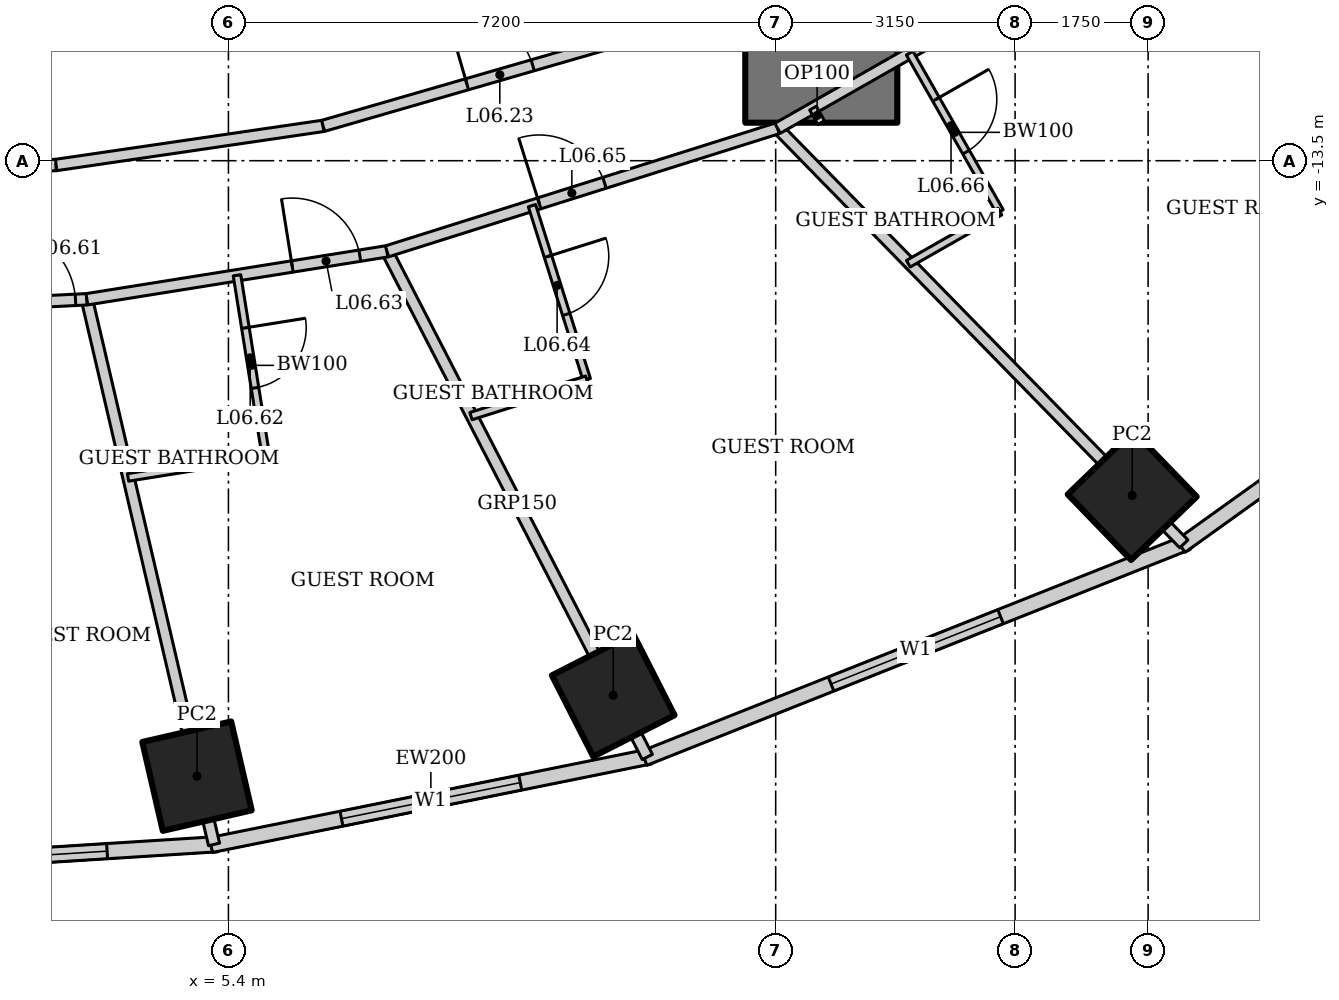
"""IFC4 building model, lengths in metres.
Left out: names, types, materials, properties, quantities, classifications, styles, units other than length and angle.
Written with IfcOpenShell. Run it as: python <this file> out.ifc"""

import sys

from ifc_helpers import new_model, si_unit, direction, frame, frame_2d, origin, origin_2d, place, context, subcontext, project, spatial, rectangle, hollow_rectangle, extrude, element, fill, save


model = new_model("IFC4")
c1 = context("Model", 3, precision=1e-05, world=origin(), true_north=direction((0.0, 1.0)))
c2 = subcontext(c1, "Body", "Model", "MODEL_VIEW")
j1 = project(units=[si_unit("LENGTHUNIT", "METRE"), si_unit("PLANEANGLEUNIT", "RADIAN")], contexts=[c1])
p1 = place(None, origin())
s1 = spatial("IfcSite", under=j1, at=p1, CompositionType="ELEMENT")
p2 = place(p1, origin())
s2 = spatial("IfcBuilding", under=s1, at=p2, CompositionType="ELEMENT")
p3 = place(p2, frame((0.0, 0.0, 37.0)))
s3 = spatial("IfcBuildingStorey", under=s2, at=p3, CompositionType="ELEMENT", Elevation=37.0)
for number, where, z_axis, x_axis in (
    (1, (4.986, -21.598, 0.0), (0.0, 0.0, 1.0), (0.974, 0.225, 0.0)),
    (2, (10.463, -20.534, 0.0), (0.0, 0.0, 1.0), (0.891, 0.454, 0.0)),
    (3, (17.291, -17.905, 0.0), (0.0, 0.0, 1.0), (0.719, 0.695, 0.0)),
):
    element("IfcColumn", number, at=place(p3, frame(where, z_axis=z_axis, x_axis=x_axis)), inside=s3, PredefinedType="COLUMN", context=c2, shape_type="SweptSolid", body=[
        extrude(hollow_rectangle(XDim=1.2, YDim=1.2, WallThickness=0.1, at=origin_2d()), origin(), (0.0, 0.0, 1.0), 3.6),
    ])
p4 = place(p3, frame((13.2, -13.0, 0.0), z_axis=(0.0, 0.0, 1.0), x_axis=(0.0, 1.0, 0.0)))
e4 = element("IfcWall", 4, at=p4, inside=s3, PredefinedType="SHEAR", context=c2, shape_type="SweptSolid", body=[
    extrude(rectangle(XDim=26.0, YDim=2.0, at=frame_2d((13.0, 0.0))), origin(), (0.0, 0.0, 1.0), 3.6),
])
p5 = place(p4, frame((12.1, 0.0, 0.0)))
e5 = element("IfcOpeningElement", 5, at=p5, cuts=e4, PredefinedType="OPENING", context=c2, shape_type="SweptSolid", body=[
    extrude(rectangle(XDim=1.8, YDim=2.1, at=frame_2d((0.9, 1.05))), frame((0.0, 1.01, 0.0), z_axis=(0.0, -1.0, 0.0), x_axis=(1.0, 0.0, 0.0)), (0.0, 0.0, 1.0), 2.02),
])
p6 = place(p3, frame((-0.041, -22.827, 0.0), z_axis=(0.0, 0.0, 1.0), x_axis=(0.998018582375, 0.062919863585, 0.0)))
e6 = element("IfcWall", 6, at=p6, inside=s3, PredefinedType="SOLIDWALL", context=c2, shape_type="SweptSolid", body=[
    extrude(rectangle(XDim=5.304, YDim=0.2, at=frame_2d((2.652, 0.0))), origin(), (0.0, 0.0, 1.0), 3.45),
])
p7 = place(p6, frame((1.452, 0.0, 0.5)))
e7 = element("IfcOpeningElement", 7, at=p7, cuts=e6, PredefinedType="OPENING", context=c2, shape_type="SweptSolid", body=[
    extrude(rectangle(XDim=2.4, YDim=2.2, at=frame_2d((1.2, 1.1))), frame((0.0, 0.11, 0.0), z_axis=(0.0, -1.0, 0.0), x_axis=(1.0, 0.0, 0.0)), (0.0, 0.0, 1.0), 0.22),
])
p8 = place(p3, frame((5.17, -22.504, 0.0), z_axis=(0.0, 0.0, 1.0), x_axis=(0.980251657452, 0.197754110105, 0.0)))
e8 = element("IfcWall", 8, at=p8, inside=s3, PredefinedType="SOLIDWALL", context=c2, shape_type="SweptSolid", body=[
    extrude(rectangle(XDim=5.904, YDim=0.2, at=frame_2d((2.952, 0.0))), origin(), (0.0, 0.0, 1.0), 3.45),
])
p9 = place(p8, frame((1.752, 0.0, 0.5)))
e9 = element("IfcOpeningElement", 9, at=p9, cuts=e8, PredefinedType="OPENING", context=c2, shape_type="SweptSolid", body=[
    extrude(rectangle(XDim=2.4, YDim=2.2, at=frame_2d((1.2, 1.1))), frame((0.0, 0.11, 0.0), z_axis=(0.0, -1.0, 0.0), x_axis=(1.0, 0.0, 0.0)), (0.0, 0.0, 1.0), 0.22),
])
p10 = place(p3, frame((10.869, -21.363, 0.0), z_axis=(0.0, 0.0, 1.0), x_axis=(0.929358351251, 0.369178892895, 0.0)))
e10 = element("IfcWall", 10, at=p10, inside=s3, PredefinedType="SOLIDWALL", context=c2, shape_type="SweptSolid", body=[
    extrude(rectangle(XDim=7.692, YDim=0.2, at=frame_2d((3.846, 0.0))), origin(), (0.0, 0.0, 1.0), 3.45),
])
p11 = place(p10, frame((2.646, 0.0, 0.5)))
e11 = element("IfcOpeningElement", 11, at=p11, cuts=e10, PredefinedType="OPENING", context=c2, shape_type="SweptSolid", body=[
    extrude(rectangle(XDim=2.4, YDim=2.2, at=frame_2d((1.2, 1.1))), frame((0.0, 0.11, 0.0), z_axis=(0.0, -1.0, 0.0), x_axis=(1.0, 0.0, 0.0)), (0.0, 0.0, 1.0), 0.22),
])
p12 = place(p3, frame((17.929, -18.572, 0.0), z_axis=(0.0, 0.0, 1.0), x_axis=(0.812791321576, 0.582554948112, 0.0)))
e12 = element("IfcWall", 12, at=p12, inside=s3, PredefinedType="SOLIDWALL", context=c2, shape_type="SweptSolid", body=[
    extrude(rectangle(XDim=8.063, YDim=0.2, at=frame_2d((4.032, 0.0))), origin(), (0.0, 0.0, 1.0), 3.45),
])
p13 = place(p12, frame((2.832, 0.0, 0.5)))
e13 = element("IfcOpeningElement", 13, at=p13, cuts=e12, PredefinedType="OPENING", context=c2, shape_type="SweptSolid", body=[
    extrude(rectangle(XDim=2.4, YDim=2.2, at=frame_2d((1.2, 1.1))), frame((0.0, 0.11, 0.0), z_axis=(0.0, -1.0, 0.0), x_axis=(1.0, 0.0, 0.0)), (0.0, 0.0, 1.0), 0.22),
])
p14 = place(p3, frame((5.211, -22.496, 0.0), z_axis=(0.0, 0.0, 1.0), x_axis=(-0.227195035564, 0.973849277771, 0.0)))
e14 = element("IfcWall", 14, at=p14, inside=s3, PredefinedType="PARTITIONING", context=c2, shape_type="SweptSolid", body=[
    extrude(rectangle(XDim=7.365, YDim=0.15, at=frame_2d((3.683, 0.0))), origin(), (0.0, 0.0, 1.0), 2.767),
])
p15 = place(p3, frame((10.912, -21.346, 0.0), z_axis=(0.0, 0.0, 1.0), x_axis=(-0.45777845119, 0.889066302154, 0.0)))
e15 = element("IfcWall", 15, at=p15, inside=s3, PredefinedType="PARTITIONING", context=c2, shape_type="SweptSolid", body=[
    extrude(rectangle(XDim=7.483, YDim=0.15, at=frame_2d((3.742, 0.0))), origin(), (0.0, 0.0, 1.0), 2.528),
])
p16 = place(p3, frame((17.97, -18.542, 0.0), z_axis=(0.0, 0.0, 1.0), x_axis=(-0.699032031211, 0.715090357467, 0.0)))
e16 = element("IfcWall", 16, at=p16, inside=s3, PredefinedType="PARTITIONING", context=c2, shape_type="SweptSolid", body=[
    extrude(rectangle(XDim=7.647, YDim=0.15, at=frame_2d((3.824, 0.0))), origin(), (0.0, 0.0, 1.0), 2.528),
])
p17 = place(p3, frame((24.435, -13.909, 0.0), z_axis=(0.0, 0.0, 1.0), x_axis=(-0.871267209855, 0.490808974074, 0.0)))
e17 = element("IfcWall", 17, at=p17, inside=s3, PredefinedType="PARTITIONING", context=c2, shape_type="SweptSolid", body=[
    extrude(rectangle(XDim=7.659, YDim=0.15, at=frame_2d((3.83, 0.0))), origin(), (0.0, 0.0, 1.0), 2.693),
])
p18 = place(p3, frame((0.0, -15.5, 0.0), z_axis=(0.0, 0.0, 1.0), x_axis=(0.998754057167, 0.049903239295, 0.0)))
e18 = element("IfcWall", 18, at=p18, inside=s3, PredefinedType="PARTITIONING", context=c2, shape_type="SweptSolid", body=[
    extrude(rectangle(XDim=3.542, YDim=0.15, at=frame_2d((1.771, 0.0))), origin(), (0.0, 0.0, 1.0), 3.45),
])
p19 = place(p18, frame((2.392, 0.0, 0.0)))
e19 = element("IfcOpeningElement", 19, at=p19, cuts=e18, PredefinedType="OPENING", context=c2, shape_type="SweptSolid", body=[
    extrude(rectangle(XDim=1.0, YDim=2.1, at=frame_2d((0.5, 1.05))), frame((0.0, 0.085, 0.0), z_axis=(0.0, -1.0, 0.0), x_axis=(1.0, 0.0, 0.0)), (0.0, 0.0, 1.0), 0.17),
])
p20 = place(p3, frame((3.538, -15.323, 0.0), z_axis=(0.0, 0.0, 1.0), x_axis=(0.987475660646, 0.157771415761, 0.0)))
e20 = element("IfcWall", 20, at=p20, inside=s3, PredefinedType="PARTITIONING", context=c2, shape_type="SweptSolid", body=[
    extrude(rectangle(XDim=3.999, YDim=0.15, at=frame_2d((1.999, 0.0))), origin(), (0.0, 0.0, 1.0), 3.45),
])
p21 = place(p20, frame((2.736, 0.0, 0.0)))
e21 = element("IfcOpeningElement", 21, at=p21, cuts=e20, PredefinedType="OPENING", context=c2, shape_type="SweptSolid", body=[
    extrude(rectangle(XDim=0.9, YDim=2.1, at=frame_2d((0.45, 1.05))), frame((0.0, 0.085, 0.0), z_axis=(0.0, -1.0, 0.0), x_axis=(1.0, 0.0, 0.0)), (0.0, 0.0, 1.0), 0.17),
])
p22 = place(p3, frame((7.486, -14.692, 0.0), z_axis=(0.0, 0.0, 1.0), x_axis=(0.953774229808, 0.30052407317, 0.0)))
e22 = element("IfcWall", 22, at=p22, inside=s3, PredefinedType="PARTITIONING", context=c2, shape_type="SweptSolid", body=[
    extrude(rectangle(XDim=5.388, YDim=0.15, at=frame_2d((2.694, 0.0))), origin(), (0.0, 0.0, 1.0), 3.45),
])
p23 = place(p22, frame((2.1, 0.0, 0.0)))
e23 = element("IfcOpeningElement", 23, at=p23, cuts=e22, PredefinedType="OPENING", context=c2, shape_type="SweptSolid", body=[
    extrude(rectangle(XDim=0.9, YDim=2.1, at=frame_2d((0.45, 1.05))), frame((0.0, 0.085, 0.0), z_axis=(0.0, -1.0, 0.0), x_axis=(1.0, 0.0, 0.0)), (0.0, 0.0, 1.0), 0.17),
])
p24 = place(p3, frame((12.625, -13.073, 0.0), z_axis=(0.0, 0.0, 1.0), x_axis=(0.86907565943, 0.494679187136, 0.0)))
e24 = element("IfcWall", 24, at=p24, inside=s3, PredefinedType="PARTITIONING", context=c2, shape_type="SweptSolid", body=[
    extrude(rectangle(XDim=5.911, YDim=0.15, at=frame_2d((2.955, 0.0))), origin(), (0.0, 0.0, 1.0), 3.45),
])
p25 = place(p24, frame((2.437, 0.0, 0.0)))
e25 = element("IfcOpeningElement", 25, at=p25, cuts=e24, PredefinedType="OPENING", context=c2, shape_type="SweptSolid", body=[
    extrude(rectangle(XDim=0.9, YDim=2.1, at=frame_2d((0.45, 1.05))), frame((0.0, 0.085, 0.0), z_axis=(0.0, -1.0, 0.0), x_axis=(1.0, 0.0, 0.0)), (0.0, 0.0, 1.0), 0.17),
])
p26 = place(p3, frame((3.13, -13.557, 0.0), z_axis=(0.0, 0.0, 1.0), x_axis=(0.989443047021, 0.14492224364, 0.0)))
e26 = element("IfcWall", 26, at=p26, inside=s3, PredefinedType="PARTITIONING", context=c2, shape_type="SweptSolid", body=[
    extrude(rectangle(XDim=3.553, YDim=0.15, at=frame_2d((1.776, 0.0))), origin(), (0.0, 0.0, 1.0), 3.45),
])
p27 = place(p3, frame((6.645, -13.042, 0.0), z_axis=(0.0, 0.0, 1.0), x_axis=(0.960678318068, 0.277663770041, 0.0)))
e27 = element("IfcWall", 27, at=p27, inside=s3, PredefinedType="PARTITIONING", context=c2, shape_type="SweptSolid", body=[
    extrude(rectangle(XDim=4.841, YDim=0.15, at=frame_2d((2.421, 0.0))), origin(), (0.0, 0.0, 1.0), 3.45),
])
p28 = place(p27, frame((1.971, 0.0, 0.0)))
e28 = element("IfcOpeningElement", 28, at=p28, cuts=e27, PredefinedType="OPENING", context=c2, shape_type="SweptSolid", body=[
    extrude(rectangle(XDim=0.9, YDim=2.1, at=frame_2d((0.45, 1.05))), frame((0.0, 0.085, 0.0), z_axis=(0.0, -1.0, 0.0), x_axis=(1.0, 0.0, 0.0)), (0.0, 0.0, 1.0), 0.17),
])
p29 = place(p3, frame((5.513, -15.008, 0.0), z_axis=(0.0, 0.0, 1.0), x_axis=(0.157780217218, -0.987474254376, 0.0)))
e29 = element("IfcWall", 29, at=p29, inside=s3, PredefinedType="PARTITIONING", context=c2, shape_type="SweptSolid", body=[
    extrude(rectangle(XDim=2.4, YDim=0.1, at=frame_2d((1.2, 0.0))), origin(), (0.0, 0.0, 1.0), 3.45),
])
p30 = place(p29, frame((0.7, 0.0, 0.0)))
e30 = element("IfcOpeningElement", 30, at=p30, cuts=e29, PredefinedType="OPENING", context=c2, shape_type="SweptSolid", body=[
    extrude(rectangle(XDim=0.8, YDim=2.1, at=frame_2d((0.4, 1.05))), frame((0.0, 0.06, 0.0), z_axis=(0.0, -1.0, 0.0), x_axis=(1.0, 0.0, 0.0)), (0.0, 0.0, 1.0), 0.12),
])
p31 = place(p3, frame((5.891, -17.378, 0.0), z_axis=(0.0, 0.0, 1.0), x_axis=(-0.987478784284, -0.157751863976, 0.0)))
e31 = element("IfcWall", 31, at=p31, inside=s3, PredefinedType="PARTITIONING", context=c2, shape_type="SweptSolid", body=[
    extrude(rectangle(XDim=1.835, YDim=0.1, at=frame_2d((0.918, 0.0))), origin(), (0.0, 0.0, 1.0), 3.45),
])
p32 = place(p3, frame((9.394, -14.091, 0.0), z_axis=(0.0, 0.0, 1.0), x_axis=(0.30049839721, -0.953782319649, 0.0)))
e32 = element("IfcWall", 32, at=p32, inside=s3, PredefinedType="PARTITIONING", context=c2, shape_type="SweptSolid", body=[
    extrude(rectangle(XDim=2.4, YDim=0.1, at=frame_2d((1.2, 0.0))), origin(), (0.0, 0.0, 1.0), 3.45),
])
p33 = place(p32, frame((0.7, 0.0, 0.0)))
e33 = element("IfcOpeningElement", 33, at=p33, cuts=e32, PredefinedType="OPENING", context=c2, shape_type="SweptSolid", body=[
    extrude(rectangle(XDim=0.8, YDim=2.1, at=frame_2d((0.4, 1.05))), frame((0.0, 0.06, 0.0), z_axis=(0.0, -1.0, 0.0), x_axis=(1.0, 0.0, 0.0)), (0.0, 0.0, 1.0), 0.12),
])
p34 = place(p3, frame((10.115, -16.38, 0.0), z_axis=(0.0, 0.0, 1.0), x_axis=(-0.953764923986, -0.300553605492, 0.0)))
e34 = element("IfcWall", 34, at=p34, inside=s3, PredefinedType="PARTITIONING", context=c2, shape_type="SweptSolid", body=[
    extrude(rectangle(XDim=1.598, YDim=0.1, at=frame_2d((0.799, 0.0))), origin(), (0.0, 0.0, 1.0), 3.45),
])
p35 = place(p3, frame((14.363, -12.084, 0.0), z_axis=(0.0, 0.0, 1.0), x_axis=(0.494703113698, -0.869062039959, 0.0)))
e35 = element("IfcWall", 35, at=p35, inside=s3, PredefinedType="PARTITIONING", context=c2, shape_type="SweptSolid", body=[
    extrude(rectangle(XDim=2.4, YDim=0.1, at=frame_2d((1.2, 0.0))), origin(), (0.0, 0.0, 1.0), 3.45),
])
p36 = place(p35, frame((0.7, 0.0, 0.0)))
e36 = element("IfcOpeningElement", 36, at=p36, cuts=e35, PredefinedType="OPENING", context=c2, shape_type="SweptSolid", body=[
    extrude(rectangle(XDim=0.8, YDim=2.1, at=frame_2d((0.4, 1.05))), frame((0.0, 0.06, 0.0), z_axis=(0.0, -1.0, 0.0), x_axis=(1.0, 0.0, 0.0)), (0.0, 0.0, 1.0), 0.12),
])
p37 = place(p3, frame((15.55, -14.17, 0.0), z_axis=(0.0, 0.0, 1.0), x_axis=(-0.869065896633, -0.494696338485, 0.0)))
e37 = element("IfcWall", 37, at=p37, inside=s3, PredefinedType="PARTITIONING", context=c2, shape_type="SweptSolid", body=[
    extrude(rectangle(XDim=1.386, YDim=0.1, at=frame_2d((0.693, 0.0))), origin(), (0.0, 0.0, 1.0), 3.45),
])
p38 = place(p3, frame((13.2, -13.0, 0.0), z_axis=(0.0, 0.0, 1.0), x_axis=(-0.49435138335, 0.869262164011, 0.0)))
e38 = element("IfcWall", 38, at=p38, inside=s3, PredefinedType="PARTITIONING", context=c2, shape_type="SweptSolid", body=[
    extrude(rectangle(XDim=0.221, YDim=0.1, at=frame_2d((0.11, 0.0))), origin(), (0.0, 0.0, 1.0), 3.45),
])
p39 = place(p3, frame((2.035, -13.607, 0.0), z_axis=(0.0, 0.0, 1.0), x_axis=(0.998946843147, 0.045882508292, 0.0)))
e39 = element("IfcWall", 39, at=p39, inside=s3, PredefinedType="PARTITIONING", context=c2, shape_type="SweptSolid", body=[
    extrude(rectangle(XDim=1.096, YDim=0.15, at=frame_2d((0.548, 0.0))), origin(), (0.0, 0.0, 1.0), 3.45),
])
p40 = place(p7, origin())
e40 = element("IfcWindow", 40, at=p40, inside=s3, PartitioningType="SINGLE_PANEL", PredefinedType="WINDOW", context=c2, shape_type="SweptSolid", body=[
    extrude(rectangle(XDim=2.4, YDim=2.2, at=frame_2d((1.2, 1.1))), frame((0.0, 0.03, 0.0), z_axis=(0.0, -1.0, 0.0), x_axis=(1.0, 0.0, 0.0)), (0.0, 0.0, 1.0), 0.06),
])
fill(e7, e40)
p41 = place(p9, origin())
e41 = element("IfcWindow", 41, at=p41, inside=s3, PartitioningType="SINGLE_PANEL", PredefinedType="WINDOW", context=c2, shape_type="SweptSolid", body=[
    extrude(rectangle(XDim=2.4, YDim=2.2, at=frame_2d((1.2, 1.1))), frame((0.0, 0.03, 0.0), z_axis=(0.0, -1.0, 0.0), x_axis=(1.0, 0.0, 0.0)), (0.0, 0.0, 1.0), 0.06),
])
fill(e9, e41)
p42 = place(p11, origin())
e42 = element("IfcWindow", 42, at=p42, inside=s3, PartitioningType="SINGLE_PANEL", PredefinedType="WINDOW", context=c2, shape_type="SweptSolid", body=[
    extrude(rectangle(XDim=2.4, YDim=2.2, at=frame_2d((1.2, 1.1))), frame((0.0, 0.03, 0.0), z_axis=(0.0, -1.0, 0.0), x_axis=(1.0, 0.0, 0.0)), (0.0, 0.0, 1.0), 0.06),
])
fill(e11, e42)
p43 = place(p28, origin())
e43 = element("IfcDoor", 43, at=p43, inside=s3, OperationType="SINGLE_SWING_LEFT", PredefinedType="DOOR", context=c2, shape_type="SweptSolid", body=[
    extrude(rectangle(XDim=0.9, YDim=2.1, at=frame_2d((0.45, 1.05))), frame((0.0, 0.025, 0.0), z_axis=(0.0, -1.0, 0.0), x_axis=(1.0, 0.0, 0.0)), (0.0, 0.0, 1.0), 0.05),
])
fill(e28, e43)
p44 = place(p19, origin())
e44 = element("IfcDoor", 44, at=p44, inside=s3, OperationType="SINGLE_SWING_LEFT", PredefinedType="DOOR", context=c2, shape_type="SweptSolid", body=[
    extrude(rectangle(XDim=1.0, YDim=2.1, at=frame_2d((0.5, 1.05))), frame((0.0, 0.025, 0.0), z_axis=(0.0, -1.0, 0.0), x_axis=(1.0, 0.0, 0.0)), (0.0, 0.0, 1.0), 0.05),
])
fill(e19, e44)
p45 = place(p30, origin())
e45 = element("IfcDoor", 45, at=p45, inside=s3, OperationType="SINGLE_SWING_LEFT", PredefinedType="DOOR", context=c2, shape_type="SweptSolid", body=[
    extrude(rectangle(XDim=0.8, YDim=2.1, at=frame_2d((0.4, 1.05))), frame((0.0, 0.025, 0.0), z_axis=(0.0, -1.0, 0.0), x_axis=(1.0, 0.0, 0.0)), (0.0, 0.0, 1.0), 0.05),
])
fill(e30, e45)
p46 = place(p21, origin())
e46 = element("IfcDoor", 46, at=p46, inside=s3, OperationType="SINGLE_SWING_LEFT", PredefinedType="DOOR", context=c2, shape_type="SweptSolid", body=[
    extrude(rectangle(XDim=0.9, YDim=2.1, at=frame_2d((0.45, 1.05))), frame((0.0, 0.025, 0.0), z_axis=(0.0, -1.0, 0.0), x_axis=(1.0, 0.0, 0.0)), (0.0, 0.0, 1.0), 0.05),
])
fill(e21, e46)
p47 = place(p33, origin())
e47 = element("IfcDoor", 47, at=p47, inside=s3, OperationType="SINGLE_SWING_LEFT", PredefinedType="DOOR", context=c2, shape_type="SweptSolid", body=[
    extrude(rectangle(XDim=0.8, YDim=2.1, at=frame_2d((0.4, 1.05))), frame((0.0, 0.025, 0.0), z_axis=(0.0, -1.0, 0.0), x_axis=(1.0, 0.0, 0.0)), (0.0, 0.0, 1.0), 0.05),
])
fill(e33, e47)
p48 = place(p23, origin())
e48 = element("IfcDoor", 48, at=p48, inside=s3, OperationType="SINGLE_SWING_LEFT", PredefinedType="DOOR", context=c2, shape_type="SweptSolid", body=[
    extrude(rectangle(XDim=0.9, YDim=2.1, at=frame_2d((0.45, 1.05))), frame((0.0, 0.025, 0.0), z_axis=(0.0, -1.0, 0.0), x_axis=(1.0, 0.0, 0.0)), (0.0, 0.0, 1.0), 0.05),
])
fill(e23, e48)
p49 = place(p36, origin())
e49 = element("IfcDoor", 49, at=p49, inside=s3, OperationType="SINGLE_SWING_LEFT", PredefinedType="DOOR", context=c2, shape_type="SweptSolid", body=[
    extrude(rectangle(XDim=0.8, YDim=2.1, at=frame_2d((0.4, 1.05))), frame((0.0, 0.025, 0.0), z_axis=(0.0, -1.0, 0.0), x_axis=(1.0, 0.0, 0.0)), (0.0, 0.0, 1.0), 0.05),
])
fill(e36, e49)
save(model, sys.argv[1])
